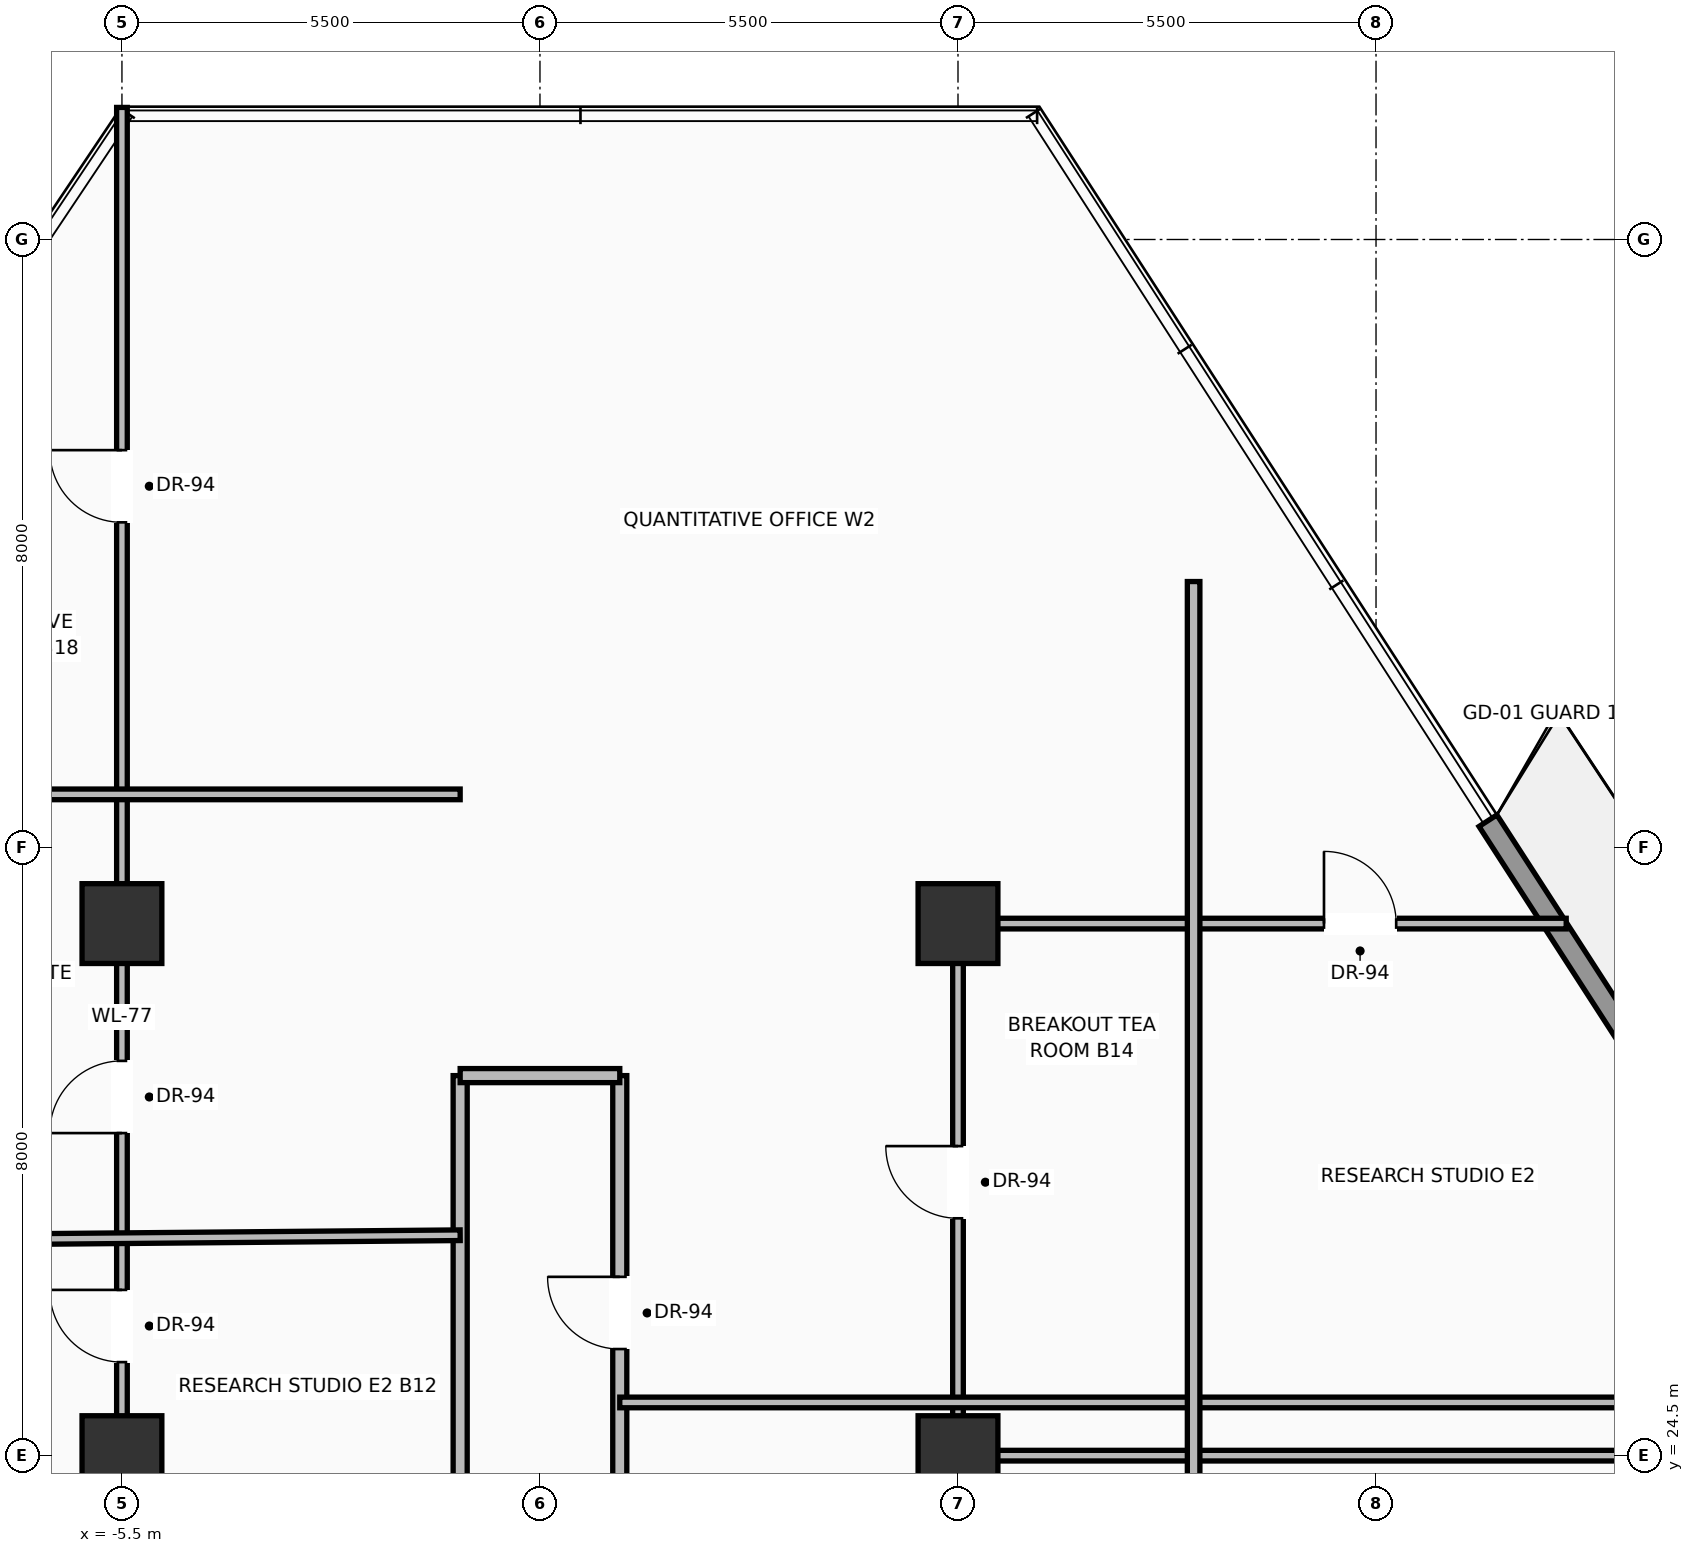
"""IFC4 building model, lengths in metres.
Left out: names, types, materials, properties, quantities, classifications, styles, units other than length and angle.
Written with IfcOpenShell. Run it as: python <this file> out.ifc"""

import sys

from ifc_helpers import new_model, si_unit, direction, frame, frame_2d, origin, origin_2d, place, context, subcontext, project, spatial, rectangle, extrude, source, transform, mapped, element, fill, save


model = new_model("IFC4")
c1 = context("Model", 3, precision=1e-05, world=origin(), true_north=direction((0.0, 1.0)))
c2 = subcontext(c1, "Body", "Model", "MODEL_VIEW")
j1 = project(units=[si_unit("LENGTHUNIT", "METRE"), si_unit("PLANEANGLEUNIT", "RADIAN")], contexts=[c1])
p1 = place(None, origin())
s1 = spatial("IfcSite", under=j1, at=p1, CompositionType="ELEMENT")
p2 = place(p1, origin())
s2 = spatial("IfcBuilding", under=s1, at=p2, CompositionType="ELEMENT")
p3 = place(p2, frame((0.0, 0.0, 98.8)))
s3 = spatial("IfcBuildingStorey", under=s2, at=p3, CompositionType="ELEMENT", Elevation=98.8)
m1 = source(origin(), c2, "Body", "SweptSolid", [
    extrude(rectangle(XDim=1.05, YDim=1.05, at=origin_2d()), origin(), (0.0, 0.0, 1.0), 3.7),
])
for number, where, z_axis, x_axis in (
    (1, (-5.5, 24.5, 0.0), (0.0, 0.0, 1.0), (1.0, 0.0, 0.0)),
    (2, (5.5, 24.5, 0.0), (0.0, 0.0, 1.0), (1.0, 0.0, 0.0)),
    (3, (-5.5, 31.5, 0.0), (0.0, 0.0, 1.0), (1.0, 0.0, 0.0)),
    (4, (5.5, 31.5, 0.0), (0.0, 0.0, 1.0), (1.0, 0.0, 0.0)),
):
    element("IfcColumn", number, at=place(p3, frame(where, z_axis=z_axis, x_axis=x_axis)), inside=s3, PredefinedType="COLUMN", context=c2, shape_type="MappedRepresentation", body=[
        mapped(m1, transform((0.0, 0.0, 0.0), scale=1.0)),
    ])
p4 = place(p3, frame((12.473, 32.854, 0.0), z_axis=(0.0, 0.0, 1.0), x_axis=(0.54263907962, -0.839965969114, 0.0)))
e5 = element("IfcWall", 5, at=p4, inside=s3, PredefinedType="SOLIDWALL", context=c2, shape_type="SweptSolid", body=[
    extrude(rectangle(XDim=17.432, YDim=0.28, at=frame_2d((8.716, 0.0))), origin(), (0.0, 0.0, 1.0), 3.03),
])
p5 = place(p4, frame((4.184, 0.0, 0.0)))
e6 = element("IfcOpeningElement", 6, at=p5, cuts=e5, PredefinedType="OPENING", context=c2, shape_type="SweptSolid", body=[
    extrude(rectangle(XDim=1.6, YDim=2.35, at=frame_2d((0.8, 1.175))), frame((0.0, 0.15, 0.0), z_axis=(0.0, -1.0, 0.0), x_axis=(1.0, 0.0, 0.0)), (0.0, 0.0, 1.0), 0.3),
])
p6 = place(p4, frame((11.854, 0.0, 0.9)))
e7 = element("IfcOpeningElement", 7, at=p6, cuts=e5, PredefinedType="OPENING", context=c2, shape_type="SweptSolid", body=[
    extrude(rectangle(XDim=2.0, YDim=1.85, at=frame_2d((1.0, 0.925))), frame((0.0, 0.15, 0.0), z_axis=(0.0, -1.0, 0.0), x_axis=(1.0, 0.0, 0.0)), (0.0, 0.0, 1.0), 0.3),
])
p7 = place(p3, frame((-1.05, 18.5, 0.0), z_axis=(0.0, 0.0, 1.0), x_axis=(0.0, 1.0, 0.0)))
e8 = element("IfcWall", 8, at=p7, inside=s3, PredefinedType="PARTITIONING", context=c2, shape_type="SweptSolid", body=[
    extrude(rectangle(XDim=11.0, YDim=0.185, at=frame_2d((5.5, 0.0))), origin(), (0.0, 0.0, 1.0), 2.747),
])
p8 = place(p7, frame((3.58, 0.0, 0.0)))
e9 = element("IfcOpeningElement", 9, at=p8, cuts=e8, PredefinedType="OPENING", context=c2, shape_type="SweptSolid", body=[
    extrude(rectangle(XDim=0.95, YDim=2.2, at=frame_2d((0.475, 1.1))), frame((0.0, 0.103, 0.0), z_axis=(0.0, -1.0, 0.0), x_axis=(1.0, 0.0, 0.0)), (0.0, 0.0, 1.0), 0.205),
])
p9 = place(p3, frame((1.05, 18.5, 0.0), z_axis=(0.0, 0.0, 1.0), x_axis=(0.0, 1.0, 0.0)))
e10 = element("IfcWall", 10, at=p9, inside=s3, PredefinedType="PARTITIONING", context=c2, shape_type="SweptSolid", body=[
    extrude(rectangle(XDim=11.0, YDim=0.185, at=frame_2d((5.5, 0.0))), origin(), (0.0, 0.0, 1.0), 2.747),
])
p10 = place(p9, frame((7.403, 0.0, 0.0)))
e11 = element("IfcOpeningElement", 11, at=p10, cuts=e10, PredefinedType="OPENING", context=c2, shape_type="SweptSolid", body=[
    extrude(rectangle(XDim=0.95, YDim=2.2, at=frame_2d((0.475, 1.1))), frame((0.0, 0.103, 0.0), z_axis=(0.0, -1.0, 0.0), x_axis=(1.0, 0.0, 0.0)), (0.0, 0.0, 1.0), 0.205),
])
p11 = place(p3, frame((-1.05, 29.5, 0.0), z_axis=(0.0, 0.0, 1.0), x_axis=(1.0, 0.0, 0.0)))
e12 = element("IfcWall", 12, at=p11, inside=s3, PredefinedType="PARTITIONING", context=c2, shape_type="SweptSolid", body=[
    extrude(rectangle(XDim=2.1, YDim=0.185, at=frame_2d((1.05, 0.0))), origin(), (0.0, 0.0, 1.0), 3.442),
])
p12 = place(p3, frame((-5.5, 18.3, 0.0), z_axis=(0.0, 0.0, 1.0), x_axis=(0.0, 1.0, 0.0)))
e13 = element("IfcWall", 13, at=p12, inside=s3, PredefinedType="PARTITIONING", context=c2, shape_type="SweptSolid", body=[
    extrude(rectangle(XDim=23.938, YDim=0.14, at=frame_2d((11.969, 0.0))), origin(), (0.0, 0.0, 1.0), 2.747),
])
p13 = place(p12, frame((7.431, 0.0, 0.0)))
e14 = element("IfcOpeningElement", 14, at=p13, cuts=e13, PredefinedType="OPENING", context=c2, shape_type="SweptSolid", body=[
    extrude(rectangle(XDim=0.95, YDim=2.2, at=frame_2d((0.475, 1.1))), frame((0.0, 0.08, 0.0), z_axis=(0.0, -1.0, 0.0), x_axis=(1.0, 0.0, 0.0)), (0.0, 0.0, 1.0), 0.16),
])
p14 = place(p12, frame((10.444, 0.0, 0.0)))
e15 = element("IfcOpeningElement", 15, at=p14, cuts=e13, PredefinedType="OPENING", context=c2, shape_type="SweptSolid", body=[
    extrude(rectangle(XDim=0.95, YDim=2.2, at=frame_2d((0.475, 1.1))), frame((0.0, 0.08, 0.0), z_axis=(0.0, -1.0, 0.0), x_axis=(1.0, 0.0, 0.0)), (0.0, 0.0, 1.0), 0.16),
])
p15 = place(p12, frame((18.479, 0.0, 0.0)))
e16 = element("IfcOpeningElement", 16, at=p15, cuts=e13, PredefinedType="OPENING", context=c2, shape_type="SweptSolid", body=[
    extrude(rectangle(XDim=0.95, YDim=2.2, at=frame_2d((0.475, 1.1))), frame((0.0, 0.08, 0.0), z_axis=(0.0, -1.0, 0.0), x_axis=(1.0, 0.0, 0.0)), (0.0, 0.0, 1.0), 0.16),
])
p16 = place(p3, frame((5.5, 24.5, 0.0), z_axis=(0.0, 0.0, 1.0), x_axis=(1.0, 0.0, 0.0)))
e17 = element("IfcWall", 17, at=p16, inside=s3, PredefinedType="PARTITIONING", context=c2, shape_type="SweptSolid", body=[
    extrude(rectangle(XDim=12.524, YDim=0.14, at=frame_2d((6.262, 0.0))), origin(), (0.0, 0.0, 1.0), 2.747),
])
p17 = place(p3, frame((5.5, 24.5, 0.0), z_axis=(0.0, 0.0, 1.0), x_axis=(0.0, 1.0, 0.0)))
e18 = element("IfcWall", 18, at=p17, inside=s3, PredefinedType="PARTITIONING", context=c2, shape_type="SweptSolid", body=[
    extrude(rectangle(XDim=7.0, YDim=0.14, at=frame_2d((3.5, 0.0))), origin(), (0.0, 0.0, 1.0), 2.747),
])
p18 = place(p17, frame((3.123, 0.0, 0.0)))
e19 = element("IfcOpeningElement", 19, at=p18, cuts=e18, PredefinedType="OPENING", context=c2, shape_type="SweptSolid", body=[
    extrude(rectangle(XDim=0.95, YDim=2.2, at=frame_2d((0.475, 1.1))), frame((0.0, 0.08, 0.0), z_axis=(0.0, -1.0, 0.0), x_axis=(1.0, 0.0, 0.0)), (0.0, 0.0, 1.0), 0.16),
])
p19 = place(p3, frame((5.5, 31.5, 0.0), z_axis=(0.0, 0.0, 1.0), x_axis=(1.0, 0.0, 0.0)))
e20 = element("IfcWall", 20, at=p19, inside=s3, PredefinedType="PARTITIONING", context=c2, shape_type="SweptSolid", body=[
    extrude(rectangle(XDim=8.002, YDim=0.14, at=frame_2d((4.001, 0.0))), origin(), (0.0, 0.0, 1.0), 2.747),
])
p20 = place(p19, frame((4.815, 0.0, 0.0)))
e21 = element("IfcOpeningElement", 21, at=p20, cuts=e20, PredefinedType="OPENING", context=c2, shape_type="SweptSolid", body=[
    extrude(rectangle(XDim=0.95, YDim=2.2, at=frame_2d((0.475, 1.1))), frame((0.0, 0.08, 0.0), z_axis=(0.0, -1.0, 0.0), x_axis=(1.0, 0.0, 0.0)), (0.0, 0.0, 1.0), 0.16),
])
p21 = place(p3, frame((-15.545, 27.272, 0.0), z_axis=(0.0, 0.0, 1.0), x_axis=(0.999961057016, 0.008825216746, 0.0)))
e22 = element("IfcWall", 22, at=p21, inside=s3, PredefinedType="PARTITIONING", context=c2, shape_type="SweptSolid", body=[
    extrude(rectangle(XDim=14.496, YDim=0.14, at=frame_2d((7.248, 0.0))), origin(), (0.0, 0.0, 1.0), 2.747),
])
p22 = place(p21, frame((3.314, 0.0, 0.0)))
e23 = element("IfcOpeningElement", 23, at=p22, cuts=e22, PredefinedType="OPENING", context=c2, shape_type="SweptSolid", body=[
    extrude(rectangle(XDim=0.95, YDim=2.2, at=frame_2d((0.475, 1.1))), frame((0.0, 0.08, 0.0), z_axis=(0.0, -1.0, 0.0), x_axis=(1.0, 0.0, 0.0)), (0.0, 0.0, 1.0), 0.16),
])
p23 = place(p3, frame((-11.566, 33.2, 0.0), z_axis=(0.0, 0.0, 1.0), x_axis=(1.0, 0.0, 0.0)))
e24 = element("IfcWall", 24, at=p23, inside=s3, PredefinedType="PARTITIONING", context=c2, shape_type="SweptSolid", body=[
    extrude(rectangle(XDim=10.516, YDim=0.14, at=frame_2d((5.258, 0.0))), origin(), (0.0, 0.0, 1.0), 2.747),
])
p24 = place(p3, frame((1.05, 25.2, 0.0), z_axis=(0.0, 0.0, 1.0), x_axis=(1.0, 0.0, 0.0)))
e25 = element("IfcWall", 25, at=p24, inside=s3, PredefinedType="PARTITIONING", context=c2, shape_type="SweptSolid", body=[
    extrude(rectangle(XDim=16.522, YDim=0.14, at=frame_2d((8.261, 0.0))), origin(), (0.0, 0.0, 1.0), 2.747),
])
p25 = place(p3, frame((8.6, 18.5, 0.0), z_axis=(0.0, 0.0, 1.0), x_axis=(0.0, 1.0, 0.0)))
e26 = element("IfcWall", 26, at=p25, inside=s3, PredefinedType="PARTITIONING", context=c2, shape_type="SweptSolid", body=[
    extrude(rectangle(XDim=17.5, YDim=0.165, at=frame_2d((8.75, 0.0))), origin(), (0.0, 0.0, 1.0), 2.747),
])
m2 = source(origin(), c2, "Body", "SweptSolid", [
    extrude(rectangle(XDim=0.95, YDim=2.2, at=frame_2d((0.475, 1.1))), frame((0.0, 0.025, 0.0), z_axis=(0.0, -1.0, 0.0), x_axis=(1.0, 0.0, 0.0)), (0.0, 0.0, 1.0), 0.05),
])
p26 = place(p10, origin())
e27 = element("IfcDoor", 27, at=p26, inside=s3, OperationType="SINGLE_SWING_RIGHT", PredefinedType="DOOR", context=c2, shape_type="MappedRepresentation", body=[
    mapped(m2, transform((0.0, 0.0, 0.0), scale=1.0)),
])
fill(e11, e27)
p27 = place(p13, origin())
e28 = element("IfcDoor", 28, at=p27, inside=s3, OperationType="SINGLE_SWING_RIGHT", PredefinedType="DOOR", context=c2, shape_type="MappedRepresentation", body=[
    mapped(m2, transform((0.0, 0.0, 0.0), scale=1.0)),
])
fill(e14, e28)
p28 = place(p20, origin())
e29 = element("IfcDoor", 29, at=p28, inside=s3, OperationType="SINGLE_SWING_LEFT", PredefinedType="DOOR", context=c2, shape_type="MappedRepresentation", body=[
    mapped(m2, transform((0.0, 0.0, 0.0), scale=1.0)),
])
fill(e21, e29)
p29 = place(p18, origin())
e30 = element("IfcDoor", 30, at=p29, inside=s3, OperationType="SINGLE_SWING_RIGHT", PredefinedType="DOOR", context=c2, shape_type="MappedRepresentation", body=[
    mapped(m2, transform((0.0, 0.0, 0.0), scale=1.0)),
])
fill(e19, e30)
p30 = place(p14, origin())
e31 = element("IfcDoor", 31, at=p30, inside=s3, OperationType="SINGLE_SWING_LEFT", PredefinedType="DOOR", context=c2, shape_type="MappedRepresentation", body=[
    mapped(m2, transform((0.0, 0.0, 0.0), scale=1.0)),
])
fill(e15, e31)
p31 = place(p15, origin())
e32 = element("IfcDoor", 32, at=p31, inside=s3, OperationType="SINGLE_SWING_RIGHT", PredefinedType="DOOR", context=c2, shape_type="MappedRepresentation", body=[
    mapped(m2, transform((0.0, 0.0, 0.0), scale=1.0)),
])
fill(e16, e32)
save(model, sys.argv[1])
